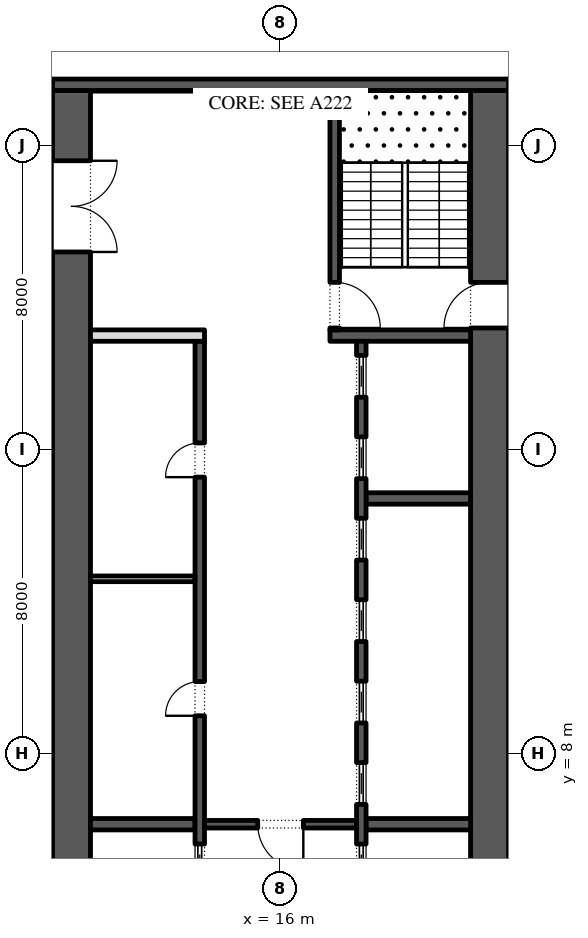
"""IFC4 building model, lengths in metres.
Left out: names, types, materials, properties, quantities, classifications, styles, units other than length and angle.
Written with IfcOpenShell. Run it as: python <this file> out.ifc"""

import sys

from ifc_helpers import new_model, si_unit, direction, frame, frame_2d, origin, place, context, subcontext, project, spatial, rectangle, extrude, element, fill, save


model = new_model("IFC4")
c1 = context("Model", 3, precision=1e-05, world=origin(), true_north=direction((0.0, 1.0)))
c2 = subcontext(c1, "Body", "Model", "MODEL_VIEW")
j1 = project(units=[si_unit("LENGTHUNIT", "METRE"), si_unit("PLANEANGLEUNIT", "RADIAN")], contexts=[c1])
p1 = place(None, origin())
s1 = spatial("IfcSite", under=j1, at=p1, CompositionType="ELEMENT")
p2 = place(p1, origin())
s2 = spatial("IfcBuilding", under=s1, at=p2, CompositionType="ELEMENT")
p3 = place(p2, frame((0.0, 0.0, 90.0)))
s3 = spatial("IfcBuildingStorey", under=s2, at=p3, CompositionType="ELEMENT", Elevation=90.0)
p4 = place(p3, frame((21.5, -2.45, 0.0), z_axis=(0.0, 0.0, 1.0), x_axis=(0.0, 1.0, 0.0)))
e1 = element("IfcWall", 1, at=p4, inside=s3, PredefinedType="SHEAR", context=c2, shape_type="SweptSolid", body=[
    extrude(rectangle(XDim=27.9, YDim=1.0, at=frame_2d((13.95, 0.0))), origin(), (0.0, 0.0, 1.0), 3.9),
])
p5 = place(p4, frame((5.05, 0.0, 0.0)))
e2 = element("IfcOpeningElement", 2, at=p5, cuts=e1, PredefinedType="OPENING", context=c2, shape_type="SweptSolid", body=[
    extrude(rectangle(XDim=1.2, YDim=2.1, at=frame_2d((0.6, 1.05))), frame((0.0, 0.51, 0.0), z_axis=(0.0, -1.0, 0.0), x_axis=(1.0, 0.0, 0.0)), (0.0, 0.0, 1.0), 1.02),
])
p6 = place(p4, frame((21.65, 0.0, 0.0)))
e3 = element("IfcOpeningElement", 3, at=p6, cuts=e1, PredefinedType="OPENING", context=c2, shape_type="SweptSolid", body=[
    extrude(rectangle(XDim=1.2, YDim=2.1, at=frame_2d((0.6, 1.05))), frame((0.0, 0.51, 0.0), z_axis=(0.0, -1.0, 0.0), x_axis=(1.0, 0.0, 0.0)), (0.0, 0.0, 1.0), 1.02),
])
p7 = place(p3, frame((10.5, -2.45, 0.0), z_axis=(0.0, 0.0, 1.0), x_axis=(0.0, 1.0, 0.0)))
e4 = element("IfcWall", 4, at=p7, inside=s3, PredefinedType="SHEAR", context=c2, shape_type="SweptSolid", body=[
    extrude(rectangle(XDim=27.9, YDim=1.0, at=frame_2d((13.95, 0.0))), origin(), (0.0, 0.0, 1.0), 3.9),
])
p8 = place(p7, frame((23.65, 0.0, 0.0)))
e5 = element("IfcOpeningElement", 5, at=p8, cuts=e4, PredefinedType="OPENING", context=c2, shape_type="SweptSolid", body=[
    extrude(rectangle(XDim=2.4, YDim=2.1, at=frame_2d((1.2, 1.05))), frame((0.0, 0.51, 0.0), z_axis=(0.0, -1.0, 0.0), x_axis=(1.0, 0.0, 0.0)), (0.0, 0.0, 1.0), 1.02),
])
p9 = place(p7, frame((1.387, 0.0, 0.0)))
e6 = element("IfcOpeningElement", 6, at=p9, cuts=e4, PredefinedType="OPENING", context=c2, shape_type="SweptSolid", body=[
    extrude(rectangle(XDim=0.9, YDim=2.1, at=frame_2d((0.45, 1.05))), frame((0.0, 0.51, 0.0), z_axis=(0.0, -1.0, 0.0), x_axis=(1.0, 0.0, 0.0)), (0.0, 0.0, 1.0), 1.02),
])
p10 = place(p7, frame((4.613, 0.0, 0.0)))
e7 = element("IfcOpeningElement", 7, at=p10, cuts=e4, PredefinedType="OPENING", context=c2, shape_type="SweptSolid", body=[
    extrude(rectangle(XDim=0.9, YDim=2.1, at=frame_2d((0.45, 1.05))), frame((0.0, 0.51, 0.0), z_axis=(0.0, -1.0, 0.0), x_axis=(1.0, 0.0, 0.0)), (0.0, 0.0, 1.0), 1.02),
])
p11 = place(p3, frame((10.0, 25.6, 0.0), z_axis=(0.0, 0.0, 1.0), x_axis=(1.0, 0.0, 0.0)))
e8 = element("IfcWall", 8, at=p11, inside=s3, PredefinedType="SHEAR", context=c2, shape_type="SweptSolid", body=[
    extrude(rectangle(XDim=12.0, YDim=0.3, at=frame_2d((6.0, 0.0))), origin(), (0.0, 0.0, 1.0), 3.9),
])
p12 = place(p3, frame((17.3, 19.0, 0.0), z_axis=(0.0, 0.0, 1.0), x_axis=(1.0, 0.0, 0.0)))
e9 = element("IfcWall", 9, at=p12, inside=s3, PredefinedType="SHEAR", context=c2, shape_type="SweptSolid", body=[
    extrude(rectangle(XDim=3.7, YDim=0.3, at=frame_2d((1.85, 0.0))), origin(), (0.0, 0.0, 1.0), 3.9),
])
p13 = place(p3, frame((17.425, 19.15, 0.0), z_axis=(0.0, 0.0, 1.0), x_axis=(0.0, 1.0, 0.0)))
e10 = element("IfcWall", 10, at=p13, inside=s3, PredefinedType="SHEAR", context=c2, shape_type="SweptSolid", body=[
    extrude(rectangle(XDim=6.3, YDim=0.25, at=frame_2d((3.15, 0.0))), origin(), (0.0, 0.0, 1.0), 3.9),
])
p14 = place(p13, frame((0.05, 0.0, 0.0)))
e11 = element("IfcOpeningElement", 11, at=p14, cuts=e10, PredefinedType="OPENING", context=c2, shape_type="SweptSolid", body=[
    extrude(rectangle(XDim=1.2, YDim=2.1, at=frame_2d((0.6, 1.05))), frame((0.0, 0.135, 0.0), z_axis=(0.0, -1.0, 0.0), x_axis=(1.0, 0.0, 0.0)), (0.0, 0.0, 1.0), 0.27),
])
for number, where, z_axis, x_axis in (
    (12, (18.25, 6.143, 0.0), (0.0, 0.0, 1.0), (1.0, 0.0, 0.0)),
    (13, (18.25, 14.714, 0.0), (0.0, 0.0, 1.0), (1.0, 0.0, 0.0)),
):
    element("IfcWall", number, at=place(p3, frame(where, z_axis=z_axis, x_axis=x_axis)), inside=s3, PredefinedType="SHEAR", context=c2, shape_type="SweptSolid", body=[
        extrude(rectangle(XDim=2.75, YDim=0.3, at=frame_2d((1.375, 0.0))), origin(), (0.0, 0.0, 1.0), 3.9),
    ])
p15 = place(p3, frame((18.125, 4.15, 0.0), z_axis=(0.0, 0.0, 1.0), x_axis=(0.0, 1.0, 0.0)))
e14 = element("IfcWall", 14, at=p15, inside=s3, PredefinedType="SHEAR", context=c2, shape_type="SweptSolid", body=[
    extrude(rectangle(XDim=14.7, YDim=0.25, at=frame_2d((7.35, 0.0))), origin(), (0.0, 0.0, 1.0), 3.9),
])
p16 = place(p15, frame((0.371, 0.0, 0.0)))
e15 = element("IfcOpeningElement", 15, at=p16, cuts=e14, PredefinedType="OPENING", context=c2, shape_type="SweptSolid", body=[
    extrude(rectangle(XDim=1.1, YDim=2.1, at=frame_2d((0.55, 1.05))), frame((0.0, 0.135, 0.0), z_axis=(0.0, -1.0, 0.0), x_axis=(1.0, 0.0, 0.0)), (0.0, 0.0, 1.0), 0.27),
])
p17 = place(p15, frame((2.514, 0.0, 0.0)))
e16 = element("IfcOpeningElement", 16, at=p17, cuts=e14, PredefinedType="OPENING", context=c2, shape_type="SweptSolid", body=[
    extrude(rectangle(XDim=1.1, YDim=2.1, at=frame_2d((0.55, 1.05))), frame((0.0, 0.135, 0.0), z_axis=(0.0, -1.0, 0.0), x_axis=(1.0, 0.0, 0.0)), (0.0, 0.0, 1.0), 0.27),
])
p18 = place(p15, frame((4.657, 0.0, 0.0)))
e17 = element("IfcOpeningElement", 17, at=p18, cuts=e14, PredefinedType="OPENING", context=c2, shape_type="SweptSolid", body=[
    extrude(rectangle(XDim=1.1, YDim=2.1, at=frame_2d((0.55, 1.05))), frame((0.0, 0.135, 0.0), z_axis=(0.0, -1.0, 0.0), x_axis=(1.0, 0.0, 0.0)), (0.0, 0.0, 1.0), 0.27),
])
p19 = place(p15, frame((6.8, 0.0, 0.0)))
e18 = element("IfcOpeningElement", 18, at=p19, cuts=e14, PredefinedType="OPENING", context=c2, shape_type="SweptSolid", body=[
    extrude(rectangle(XDim=1.1, YDim=2.1, at=frame_2d((0.55, 1.05))), frame((0.0, 0.135, 0.0), z_axis=(0.0, -1.0, 0.0), x_axis=(1.0, 0.0, 0.0)), (0.0, 0.0, 1.0), 0.27),
])
p20 = place(p15, frame((8.943, 0.0, 0.0)))
e19 = element("IfcOpeningElement", 19, at=p20, cuts=e14, PredefinedType="OPENING", context=c2, shape_type="SweptSolid", body=[
    extrude(rectangle(XDim=1.1, YDim=2.1, at=frame_2d((0.55, 1.05))), frame((0.0, 0.135, 0.0), z_axis=(0.0, -1.0, 0.0), x_axis=(1.0, 0.0, 0.0)), (0.0, 0.0, 1.0), 0.27),
])
p21 = place(p15, frame((11.086, 0.0, 0.0)))
e20 = element("IfcOpeningElement", 20, at=p21, cuts=e14, PredefinedType="OPENING", context=c2, shape_type="SweptSolid", body=[
    extrude(rectangle(XDim=1.1, YDim=2.1, at=frame_2d((0.55, 1.05))), frame((0.0, 0.135, 0.0), z_axis=(0.0, -1.0, 0.0), x_axis=(1.0, 0.0, 0.0)), (0.0, 0.0, 1.0), 0.27),
])
p22 = place(p15, frame((13.229, 0.0, 0.0)))
e21 = element("IfcOpeningElement", 21, at=p22, cuts=e14, PredefinedType="OPENING", context=c2, shape_type="SweptSolid", body=[
    extrude(rectangle(XDim=1.1, YDim=2.1, at=frame_2d((0.55, 1.05))), frame((0.0, 0.135, 0.0), z_axis=(0.0, -1.0, 0.0), x_axis=(1.0, 0.0, 0.0)), (0.0, 0.0, 1.0), 0.27),
])
p23 = place(p3, frame((11.0, 6.143, 0.0), z_axis=(0.0, 0.0, 1.0), x_axis=(1.0, 0.0, 0.0)))
e22 = element("IfcWall", 22, at=p23, inside=s3, PredefinedType="SHEAR", context=c2, shape_type="SweptSolid", body=[
    extrude(rectangle(XDim=2.75, YDim=0.3, at=frame_2d((1.375, 0.0))), origin(), (0.0, 0.0, 1.0), 3.9),
])
p24 = place(p3, frame((13.875, -2.45, 0.0), z_axis=(0.0, 0.0, 1.0), x_axis=(0.0, 1.0, 0.0)))
e23 = element("IfcWall", 23, at=p24, inside=s3, PredefinedType="SHEAR", context=c2, shape_type="SweptSolid", body=[
    extrude(rectangle(XDim=21.3, YDim=0.25, at=frame_2d((10.65, 0.0))), origin(), (0.0, 0.0, 1.0), 3.9),
])
p25 = place(p24, frame((11.446, 0.0, 0.0)))
e24 = element("IfcOpeningElement", 24, at=p25, cuts=e23, PredefinedType="OPENING", context=c2, shape_type="SweptSolid", body=[
    extrude(rectangle(XDim=0.9, YDim=2.1, at=frame_2d((0.45, 1.05))), frame((0.0, 0.135, 0.0), z_axis=(0.0, -1.0, 0.0), x_axis=(1.0, 0.0, 0.0)), (0.0, 0.0, 1.0), 0.27),
])
p26 = place(p24, frame((17.725, 0.0, 0.0)))
e25 = element("IfcOpeningElement", 25, at=p26, cuts=e23, PredefinedType="OPENING", context=c2, shape_type="SweptSolid", body=[
    extrude(rectangle(XDim=0.9, YDim=2.1, at=frame_2d((0.45, 1.05))), frame((0.0, 0.135, 0.0), z_axis=(0.0, -1.0, 0.0), x_axis=(1.0, 0.0, 0.0)), (0.0, 0.0, 1.0), 0.27),
])
p27 = place(p24, frame((6.971, 0.0, 0.0)))
e26 = element("IfcOpeningElement", 26, at=p27, cuts=e23, PredefinedType="OPENING", context=c2, shape_type="SweptSolid", body=[
    extrude(rectangle(XDim=1.1, YDim=2.1, at=frame_2d((0.55, 1.05))), frame((0.0, 0.135, 0.0), z_axis=(0.0, -1.0, 0.0), x_axis=(1.0, 0.0, 0.0)), (0.0, 0.0, 1.0), 0.27),
])
p28 = place(p3, frame((11.0, 19.0, 0.0), z_axis=(0.0, 0.0, 1.0), x_axis=(1.0, 0.0, 0.0)))
e27 = element("IfcWall", 27, at=p28, inside=s3, PredefinedType="PARTITIONING", context=c2, shape_type="SweptSolid", body=[
    extrude(rectangle(XDim=3.0, YDim=0.3, at=frame_2d((1.5, 0.0))), origin(), (0.0, 0.0, 1.0), 3.9),
])
p29 = place(p3, frame((11.0, 12.6, 0.0), z_axis=(0.0, 0.0, 1.0), x_axis=(1.0, 0.0, 0.0)))
e28 = element("IfcWall", 28, at=p29, inside=s3, PredefinedType="PARTITIONING", context=c2, shape_type="SweptSolid", body=[
    extrude(rectangle(XDim=2.75, YDim=0.15, at=frame_2d((1.375, 0.0))), origin(), (0.0, 0.0, 1.0), 3.9),
])
p30 = place(p3, frame((14.0, 6.143, 0.0), z_axis=(0.0, 0.0, 1.0), x_axis=(1.0, 0.0, 0.0)))
e29 = element("IfcWall", 29, at=p30, inside=s3, PredefinedType="SHEAR", context=c2, shape_type="SweptSolid", body=[
    extrude(rectangle(XDim=4.0, YDim=0.2, at=frame_2d((2.0, 0.0))), origin(), (0.0, 0.0, 1.0), 3.9),
])
p31 = place(p30, frame((1.4, 0.0, 0.0)))
e30 = element("IfcOpeningElement", 30, at=p31, cuts=e29, PredefinedType="OPENING", context=c2, shape_type="SweptSolid", body=[
    extrude(rectangle(XDim=1.2, YDim=2.1, at=frame_2d((0.6, 1.05))), frame((0.0, 0.11, 0.0), z_axis=(0.0, -1.0, 0.0), x_axis=(1.0, 0.0, 0.0)), (0.0, 0.0, 1.0), 0.22),
])
p32 = place(p16, origin())
e31 = element("IfcDoor", 31, at=p32, inside=s3, OperationType="SLIDING_TO_LEFT", PredefinedType="DOOR", context=c2, shape_type="SweptSolid", body=[
    extrude(rectangle(XDim=1.1, YDim=2.1, at=frame_2d((0.55, 1.05))), frame((0.0, 0.025, 0.0), z_axis=(0.0, -1.0, 0.0), x_axis=(1.0, 0.0, 0.0)), (0.0, 0.0, 1.0), 0.05),
])
fill(e15, e31)
p33 = place(p17, origin())
e32 = element("IfcDoor", 32, at=p33, inside=s3, OperationType="SLIDING_TO_LEFT", PredefinedType="DOOR", context=c2, shape_type="SweptSolid", body=[
    extrude(rectangle(XDim=1.1, YDim=2.1, at=frame_2d((0.55, 1.05))), frame((0.0, 0.025, 0.0), z_axis=(0.0, -1.0, 0.0), x_axis=(1.0, 0.0, 0.0)), (0.0, 0.0, 1.0), 0.05),
])
fill(e16, e32)
p34 = place(p18, origin())
e33 = element("IfcDoor", 33, at=p34, inside=s3, OperationType="SLIDING_TO_LEFT", PredefinedType="DOOR", context=c2, shape_type="SweptSolid", body=[
    extrude(rectangle(XDim=1.1, YDim=2.1, at=frame_2d((0.55, 1.05))), frame((0.0, 0.025, 0.0), z_axis=(0.0, -1.0, 0.0), x_axis=(1.0, 0.0, 0.0)), (0.0, 0.0, 1.0), 0.05),
])
fill(e17, e33)
p35 = place(p19, origin())
e34 = element("IfcDoor", 34, at=p35, inside=s3, OperationType="SLIDING_TO_LEFT", PredefinedType="DOOR", context=c2, shape_type="SweptSolid", body=[
    extrude(rectangle(XDim=1.1, YDim=2.1, at=frame_2d((0.55, 1.05))), frame((0.0, 0.025, 0.0), z_axis=(0.0, -1.0, 0.0), x_axis=(1.0, 0.0, 0.0)), (0.0, 0.0, 1.0), 0.05),
])
fill(e18, e34)
p36 = place(p20, origin())
e35 = element("IfcDoor", 35, at=p36, inside=s3, OperationType="SLIDING_TO_LEFT", PredefinedType="DOOR", context=c2, shape_type="SweptSolid", body=[
    extrude(rectangle(XDim=1.1, YDim=2.1, at=frame_2d((0.55, 1.05))), frame((0.0, 0.025, 0.0), z_axis=(0.0, -1.0, 0.0), x_axis=(1.0, 0.0, 0.0)), (0.0, 0.0, 1.0), 0.05),
])
fill(e19, e35)
p37 = place(p21, origin())
e36 = element("IfcDoor", 36, at=p37, inside=s3, OperationType="SLIDING_TO_LEFT", PredefinedType="DOOR", context=c2, shape_type="SweptSolid", body=[
    extrude(rectangle(XDim=1.1, YDim=2.1, at=frame_2d((0.55, 1.05))), frame((0.0, 0.025, 0.0), z_axis=(0.0, -1.0, 0.0), x_axis=(1.0, 0.0, 0.0)), (0.0, 0.0, 1.0), 0.05),
])
fill(e20, e36)
p38 = place(p22, origin())
e37 = element("IfcDoor", 37, at=p38, inside=s3, OperationType="SLIDING_TO_LEFT", PredefinedType="DOOR", context=c2, shape_type="SweptSolid", body=[
    extrude(rectangle(XDim=1.1, YDim=2.1, at=frame_2d((0.55, 1.05))), frame((0.0, 0.025, 0.0), z_axis=(0.0, -1.0, 0.0), x_axis=(1.0, 0.0, 0.0)), (0.0, 0.0, 1.0), 0.05),
])
fill(e21, e37)
p39 = place(p25, origin())
e38 = element("IfcDoor", 38, at=p39, inside=s3, OperationType="SINGLE_SWING_RIGHT", PredefinedType="DOOR", context=c2, shape_type="SweptSolid", body=[
    extrude(rectangle(XDim=0.9, YDim=2.1, at=frame_2d((0.45, 1.05))), frame((0.0, 0.125, 0.0), z_axis=(0.0, -1.0, 0.0), x_axis=(1.0, 0.0, 0.0)), (0.0, 0.0, 1.0), 0.05),
])
fill(e24, e38)
p40 = place(p26, origin())
e39 = element("IfcDoor", 39, at=p40, inside=s3, OperationType="SINGLE_SWING_RIGHT", PredefinedType="DOOR", context=c2, shape_type="SweptSolid", body=[
    extrude(rectangle(XDim=0.9, YDim=2.1, at=frame_2d((0.45, 1.05))), frame((0.0, 0.125, 0.0), z_axis=(0.0, -1.0, 0.0), x_axis=(1.0, 0.0, 0.0)), (0.0, 0.0, 1.0), 0.05),
])
fill(e25, e39)
p41 = place(p27, origin())
e40 = element("IfcDoor", 40, at=p41, inside=s3, OperationType="SLIDING_TO_LEFT", PredefinedType="DOOR", context=c2, shape_type="SweptSolid", body=[
    extrude(rectangle(XDim=1.1, YDim=2.1, at=frame_2d((0.55, 1.05))), frame((0.0, 0.025, 0.0), z_axis=(0.0, -1.0, 0.0), x_axis=(1.0, 0.0, 0.0)), (0.0, 0.0, 1.0), 0.05),
])
fill(e26, e40)
p42 = place(p31, frame((1.2, 0.0, 0.0), z_axis=(0.0, 0.0, 1.0), x_axis=(-1.0, 0.0, 0.0)))
e41 = element("IfcDoor", 41, at=p42, inside=s3, OperationType="SINGLE_SWING_RIGHT", PredefinedType="DOOR", context=c2, shape_type="SweptSolid", body=[
    extrude(rectangle(XDim=1.2, YDim=2.1, at=frame_2d((0.6, 1.05))), frame((0.0, 0.025, 0.0), z_axis=(0.0, -1.0, 0.0), x_axis=(1.0, 0.0, 0.0)), (0.0, 0.0, 1.0), 0.05),
])
fill(e30, e41)
p43 = place(p8, frame((2.4, 0.0, 0.0), z_axis=(0.0, 0.0, 1.0), x_axis=(-1.0, 0.0, 0.0)))
e42 = element("IfcDoor", 42, at=p43, inside=s3, OperationType="DOUBLE_DOOR_SINGLE_SWING", PredefinedType="DOOR", context=c2, shape_type="SweptSolid", body=[
    extrude(rectangle(XDim=2.4, YDim=2.1, at=frame_2d((1.2, 1.05))), frame((0.0, 0.025, 0.0), z_axis=(0.0, -1.0, 0.0), x_axis=(1.0, 0.0, 0.0)), (0.0, 0.0, 1.0), 0.05),
])
fill(e5, e42)
p44 = place(p14, frame((1.2, 0.0, 0.0), z_axis=(0.0, 0.0, 1.0), x_axis=(-1.0, 0.0, 0.0)))
e43 = element("IfcDoor", 43, at=p44, inside=s3, OperationType="SINGLE_SWING_LEFT", PredefinedType="DOOR", context=c2, shape_type="SweptSolid", body=[
    extrude(rectangle(XDim=1.2, YDim=2.1, at=frame_2d((0.6, 1.05))), frame((0.0, 0.025, 0.0), z_axis=(0.0, -1.0, 0.0), x_axis=(1.0, 0.0, 0.0)), (0.0, 0.0, 1.0), 0.05),
])
fill(e11, e43)
p45 = place(p6, origin())
e44 = element("IfcDoor", 44, at=p45, inside=s3, OperationType="SINGLE_SWING_RIGHT", PredefinedType="DOOR", context=c2, shape_type="SweptSolid", body=[
    extrude(rectangle(XDim=1.2, YDim=2.1, at=frame_2d((0.6, 1.05))), frame((0.0, 0.025, 0.0), z_axis=(0.0, -1.0, 0.0), x_axis=(1.0, 0.0, 0.0)), (0.0, 0.0, 1.0), 0.05),
])
fill(e3, e44)
save(model, sys.argv[1])
